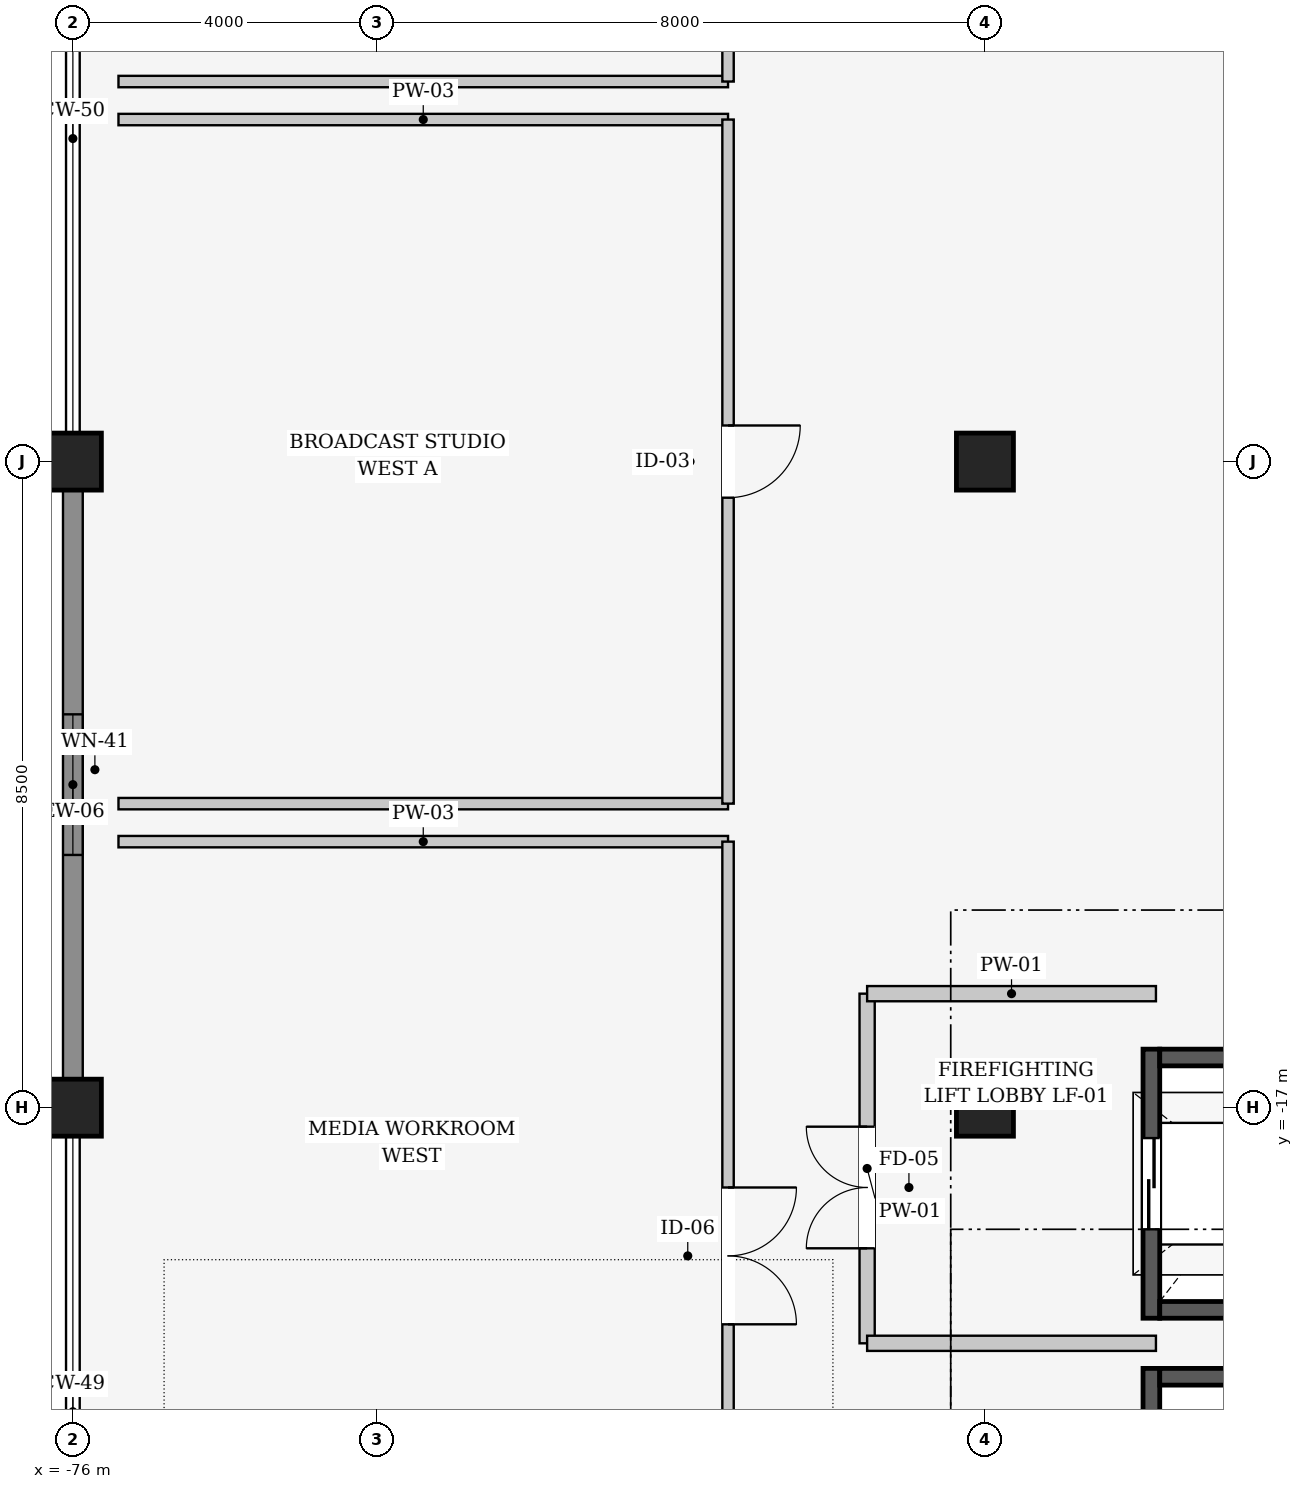
"""IFC4 building model, lengths in metres.
Left out: names, types, materials, properties, quantities, classifications, styles, units other than length and angle.
Written with IfcOpenShell. Run it as: python <this file> out.ifc"""

import sys

from ifc_helpers import new_model, si_unit, direction, frame, frame_2d, origin, origin_2d, place, context, subcontext, project, spatial, rectangle, extrude, element, fill, save


model = new_model("IFC4")
c1 = context("Model", 3, precision=1e-05, world=origin(), true_north=direction((0.0, 1.0)))
c2 = subcontext(c1, "Body", "Model", "MODEL_VIEW")
j1 = project(units=[si_unit("LENGTHUNIT", "METRE"), si_unit("PLANEANGLEUNIT", "RADIAN")], contexts=[c1])
p1 = place(None, origin())
s1 = spatial("IfcSite", under=j1, at=p1, CompositionType="ELEMENT")
p2 = place(p1, origin())
s2 = spatial("IfcBuilding", under=s1, at=p2, CompositionType="ELEMENT")
p3 = place(p2, frame((0.0, 0.0, 26.4)))
s3 = spatial("IfcBuildingStorey", under=s2, at=p3, CompositionType="ELEMENT", Elevation=26.4)
for number, where, z_axis, x_axis in (
    (1, (-76.0, -17.0, 0.0), (0.0, 0.0, 1.0), (1.0, 0.0, 0.0)),
    (2, (-76.0, -8.5, 0.0), (0.0, 0.0, 1.0), (1.0, 0.0, 0.0)),
    (3, (-64.0, -17.0, 0.0), (0.0, 0.0, 1.0), (1.0, 0.0, 0.0)),
    (4, (-64.0, -8.5, 0.0), (0.0, 0.0, 1.0), (1.0, 0.0, 0.0)),
):
    element("IfcColumn", number, at=place(p3, frame(where, z_axis=z_axis, x_axis=x_axis)), inside=s3, PredefinedType="COLUMN", context=c2, shape_type="SweptSolid", body=[
        extrude(rectangle(XDim=0.75, YDim=0.75, at=origin_2d()), origin(), (0.0, 0.0, 1.0), 5.4),
    ])
p4 = place(p3, frame((-76.0, -16.643, 0.0), z_axis=(0.0, 0.0, 1.0), x_axis=(0.0, 1.0, 0.0)))
e5 = element("IfcWall", 5, at=p4, inside=s3, PredefinedType="SOLIDWALL", context=c2, shape_type="SweptSolid", body=[
    extrude(rectangle(XDim=7.786, YDim=0.26, at=frame_2d((3.893, 0.0))), origin(), (0.0, 0.0, 1.0), 4.22),
])
p5 = place(p4, frame((2.968, 0.0, 0.95)))
e6 = element("IfcOpeningElement", 6, at=p5, cuts=e5, PredefinedType="OPENING", context=c2, shape_type="SweptSolid", body=[
    extrude(rectangle(XDim=1.85, YDim=2.25, at=frame_2d((0.925, 1.125))), frame((0.0, 0.14, 0.0), z_axis=(0.0, -1.0, 0.0), x_axis=(1.0, 0.0, 0.0)), (0.0, 0.0, 1.0), 0.28),
])
p6 = place(p3, frame((-61.81, -19.77, 0.0), z_axis=(0.0, 0.0, 1.0), x_axis=(0.0, 1.0, 0.0)))
e7 = element("IfcWall", 7, at=p6, inside=s3, PredefinedType="SHEAR", context=c2, shape_type="SweptSolid", body=[
    extrude(rectangle(XDim=3.54, YDim=0.22, at=frame_2d((1.77, 0.0))), origin(), (0.0, 0.0, 1.0), 6.8),
])
p7 = place(p6, frame((1.17, 0.0, 0.0)))
e8 = element("IfcOpeningElement", 8, at=p7, cuts=e7, PredefinedType="OPENING", context=c2, shape_type="SweptSolid", body=[
    extrude(rectangle(XDim=1.2, YDim=2.2, at=frame_2d((0.6, 1.1))), frame((0.0, 0.12, 0.0), z_axis=(0.0, -1.0, 0.0), x_axis=(1.0, 0.0, 0.0)), (0.0, 0.0, 1.0), 0.24),
])
for number, where, z_axis, x_axis in (
    (9, (-61.7, -16.34, 0.0), (0.0, 0.0, 1.0), (1.0, 0.0, 0.0)),
    (10, (-59.3, -19.66, 0.0), (0.0, 0.0, 1.0), (-1.0, 0.0, 0.0)),
):
    element("IfcWall", number, at=place(p3, frame(where, z_axis=z_axis, x_axis=x_axis)), inside=s3, PredefinedType="SHEAR", context=c2, shape_type="SweptSolid", body=[
        extrude(rectangle(XDim=2.4, YDim=0.22, at=frame_2d((1.2, 0.0))), origin(), (0.0, 0.0, 1.0), 6.8),
    ])
p8 = place(p3, frame((-61.81, -23.97, 0.0), z_axis=(0.0, 0.0, 1.0), x_axis=(0.0, 1.0, 0.0)))
e11 = element("IfcWall", 11, at=p8, inside=s3, PredefinedType="SHEAR", context=c2, shape_type="SweptSolid", body=[
    extrude(rectangle(XDim=3.54, YDim=0.22, at=frame_2d((1.77, 0.0))), origin(), (0.0, 0.0, 1.0), 6.8),
])
p9 = place(p8, frame((1.22, 0.0, 0.0)))
e12 = element("IfcOpeningElement", 12, at=p9, cuts=e11, PredefinedType="OPENING", context=c2, shape_type="SweptSolid", body=[
    extrude(rectangle(XDim=1.1, YDim=2.2, at=frame_2d((0.55, 1.1))), frame((0.0, 0.12, 0.0), z_axis=(0.0, -1.0, 0.0), x_axis=(1.0, 0.0, 0.0)), (0.0, 0.0, 1.0), 0.24),
])
p10 = place(p3, frame((-61.7, -20.54, 0.0), z_axis=(0.0, 0.0, 1.0), x_axis=(1.0, 0.0, 0.0)))
e13 = element("IfcWall", 13, at=p10, inside=s3, PredefinedType="SHEAR", context=c2, shape_type="SweptSolid", body=[
    extrude(rectangle(XDim=2.4, YDim=0.22, at=frame_2d((1.2, 0.0))), origin(), (0.0, 0.0, 1.0), 6.8),
])
p11 = place(p3, frame((-65.55, -20.1, 0.0), z_axis=(0.0, 0.0, 1.0), x_axis=(0.0, 1.0, 0.0)))
e14 = element("IfcWall", 14, at=p11, inside=s3, PredefinedType="PARTITIONING", context=c2, shape_type="SweptSolid", body=[
    extrude(rectangle(XDim=4.6, YDim=0.2, at=frame_2d((2.3, 0.0))), origin(), (0.0, 0.0, 1.0), 4.205),
])
p12 = place(p11, frame((1.25, 0.0, 0.0)))
e15 = element("IfcOpeningElement", 15, at=p12, cuts=e14, PredefinedType="OPENING", context=c2, shape_type="SweptSolid", body=[
    extrude(rectangle(XDim=1.6, YDim=2.2, at=frame_2d((0.8, 1.1))), frame((0.0, 0.11, 0.0), z_axis=(0.0, -1.0, 0.0), x_axis=(1.0, 0.0, 0.0)), (0.0, 0.0, 1.0), 0.22),
])
for number, where, z_axis, x_axis in (
    (16, (-65.55, -15.5, 0.0), (0.0, 0.0, 1.0), (1.0, 0.0, 0.0)),
    (17, (-61.75, -20.1, 0.0), (0.0, 0.0, 1.0), (-1.0, 0.0, 0.0)),
):
    element("IfcWall", number, at=place(p3, frame(where, z_axis=z_axis, x_axis=x_axis)), inside=s3, PredefinedType="PARTITIONING", context=c2, shape_type="SweptSolid", body=[
        extrude(rectangle(XDim=3.8, YDim=0.2, at=frame_2d((1.9, 0.0))), origin(), (0.0, 0.0, 1.0), 4.505),
    ])
p13 = place(p3, frame((-75.4, -13.5, 0.0), z_axis=(0.0, 0.0, 1.0), x_axis=(1.0, 0.0, 0.0)))
e18 = element("IfcWall", 18, at=p13, inside=s3, PredefinedType="PARTITIONING", context=c2, shape_type="SweptSolid", body=[
    extrude(rectangle(XDim=8.02, YDim=0.15, at=frame_2d((4.01, 0.0))), origin(), (0.0, 0.0, 1.0), 5.04),
])
p14 = place(p3, frame((-67.38, -13.5, 0.0), z_axis=(0.0, 0.0, 1.0), x_axis=(0.0, -1.0, 0.0)))
e19 = element("IfcWall", 19, at=p14, inside=s3, PredefinedType="PARTITIONING", context=c2, shape_type="SweptSolid", body=[
    extrude(rectangle(XDim=10.9, YDim=0.15, at=frame_2d((5.45, 0.0))), origin(), (0.0, 0.0, 1.0), 4.205),
])
p15 = place(p14, frame((4.55, 0.0, 0.0)))
e20 = element("IfcOpeningElement", 20, at=p15, cuts=e19, PredefinedType="OPENING", context=c2, shape_type="SweptSolid", body=[
    extrude(rectangle(XDim=1.8, YDim=2.2, at=frame_2d((0.9, 1.1))), frame((0.0, 0.085, 0.0), z_axis=(0.0, -1.0, 0.0), x_axis=(1.0, 0.0, 0.0)), (0.0, 0.0, 1.0), 0.17),
])
for number, where, z_axis, x_axis in (
    (21, (-75.4, -4.0, 0.0), (0.0, 0.0, 1.0), (1.0, 0.0, 0.0)),
    (22, (-67.38, -13.0, 0.0), (0.0, 0.0, 1.0), (-1.0, 0.0, 0.0)),
):
    element("IfcWall", number, at=place(p3, frame(where, z_axis=z_axis, x_axis=x_axis)), inside=s3, PredefinedType="PARTITIONING", context=c2, shape_type="SweptSolid", body=[
        extrude(rectangle(XDim=8.02, YDim=0.15, at=frame_2d((4.01, 0.0))), origin(), (0.0, 0.0, 1.0), 4.842),
    ])
p16 = place(p3, frame((-67.38, -4.0, 0.0), z_axis=(0.0, 0.0, 1.0), x_axis=(0.0, -1.0, 0.0)))
e23 = element("IfcWall", 23, at=p16, inside=s3, PredefinedType="PARTITIONING", context=c2, shape_type="SweptSolid", body=[
    extrude(rectangle(XDim=9.0, YDim=0.15, at=frame_2d((4.5, 0.0))), origin(), (0.0, 0.0, 1.0), 4.205),
])
p17 = place(p16, frame((4.025, 0.0, 0.0)))
e24 = element("IfcOpeningElement", 24, at=p17, cuts=e23, PredefinedType="OPENING", context=c2, shape_type="SweptSolid", body=[
    extrude(rectangle(XDim=0.95, YDim=2.15, at=frame_2d((0.475, 1.075))), frame((0.0, 0.085, 0.0), z_axis=(0.0, -1.0, 0.0), x_axis=(1.0, 0.0, 0.0)), (0.0, 0.0, 1.0), 0.17),
])
p18 = place(p3, frame((-67.38, -3.5, 0.0), z_axis=(0.0, 0.0, 1.0), x_axis=(-1.0, 0.0, 0.0)))
e25 = element("IfcWall", 25, at=p18, inside=s3, PredefinedType="PARTITIONING", context=c2, shape_type="SweptSolid", body=[
    extrude(rectangle(XDim=8.02, YDim=0.15, at=frame_2d((4.01, 0.0))), origin(), (0.0, 0.0, 1.0), 5.04),
])
p19 = place(p3, frame((-67.38, 4.5, 0.0), z_axis=(0.0, 0.0, 1.0), x_axis=(0.0, -1.0, 0.0)))
e26 = element("IfcWall", 26, at=p19, inside=s3, PredefinedType="PARTITIONING", context=c2, shape_type="SweptSolid", body=[
    extrude(rectangle(XDim=8.0, YDim=0.15, at=frame_2d((4.0, 0.0))), origin(), (0.0, 0.0, 1.0), 4.205),
])
p20 = place(p19, frame((3.525, 0.0, 0.0)))
e27 = element("IfcOpeningElement", 27, at=p20, cuts=e26, PredefinedType="OPENING", context=c2, shape_type="SweptSolid", body=[
    extrude(rectangle(XDim=0.95, YDim=2.15, at=frame_2d((0.475, 1.075))), frame((0.0, 0.085, 0.0), z_axis=(0.0, -1.0, 0.0), x_axis=(1.0, 0.0, 0.0)), (0.0, 0.0, 1.0), 0.17),
])
p21 = place(p5, origin())
e28 = element("IfcWindow", 28, at=p21, inside=s3, PartitioningType="SINGLE_PANEL", PredefinedType="WINDOW", context=c2, shape_type="SweptSolid", body=[
    extrude(rectangle(XDim=1.85, YDim=2.25, at=frame_2d((0.925, 1.125))), frame((0.0, 0.03, 0.0), z_axis=(0.0, -1.0, 0.0), x_axis=(1.0, 0.0, 0.0)), (0.0, 0.0, 1.0), 0.06),
])
fill(e6, e28)
p22 = place(p7, origin())
e29 = element("IfcDoor", 29, at=p22, inside=s3, OperationType="SLIDING_TO_LEFT", PredefinedType="DOOR", context=c2, shape_type="SweptSolid", body=[
    extrude(rectangle(XDim=1.2, YDim=2.2, at=frame_2d((0.6, 1.1))), frame((0.0, 0.025, 0.0), z_axis=(0.0, -1.0, 0.0), x_axis=(1.0, 0.0, 0.0)), (0.0, 0.0, 1.0), 0.05),
])
fill(e8, e29)
p23 = place(p12, origin())
e30 = element("IfcDoor", 30, at=p23, inside=s3, OperationType="DOUBLE_DOOR_SINGLE_SWING", PredefinedType="DOOR", context=c2, shape_type="SweptSolid", body=[
    extrude(rectangle(XDim=1.6, YDim=2.2, at=frame_2d((0.8, 1.1))), frame((0.0, 0.025, 0.0), z_axis=(0.0, -1.0, 0.0), x_axis=(1.0, 0.0, 0.0)), (0.0, 0.0, 1.0), 0.05),
])
fill(e15, e30)
p24 = place(p15, origin())
e31 = element("IfcDoor", 31, at=p24, inside=s3, OperationType="DOUBLE_DOOR_SINGLE_SWING", PredefinedType="DOOR", context=c2, shape_type="SweptSolid", body=[
    extrude(rectangle(XDim=1.8, YDim=2.2, at=frame_2d((0.9, 1.1))), frame((0.0, 0.025, 0.0), z_axis=(0.0, -1.0, 0.0), x_axis=(1.0, 0.0, 0.0)), (0.0, 0.0, 1.0), 0.05),
])
fill(e20, e31)
p25 = place(p17, origin())
e32 = element("IfcDoor", 32, at=p25, inside=s3, OperationType="SINGLE_SWING_LEFT", PredefinedType="DOOR", context=c2, shape_type="SweptSolid", body=[
    extrude(rectangle(XDim=0.95, YDim=2.15, at=frame_2d((0.475, 1.075))), frame((0.0, 0.025, 0.0), z_axis=(0.0, -1.0, 0.0), x_axis=(1.0, 0.0, 0.0)), (0.0, 0.0, 1.0), 0.05),
])
fill(e24, e32)
save(model, sys.argv[1])
